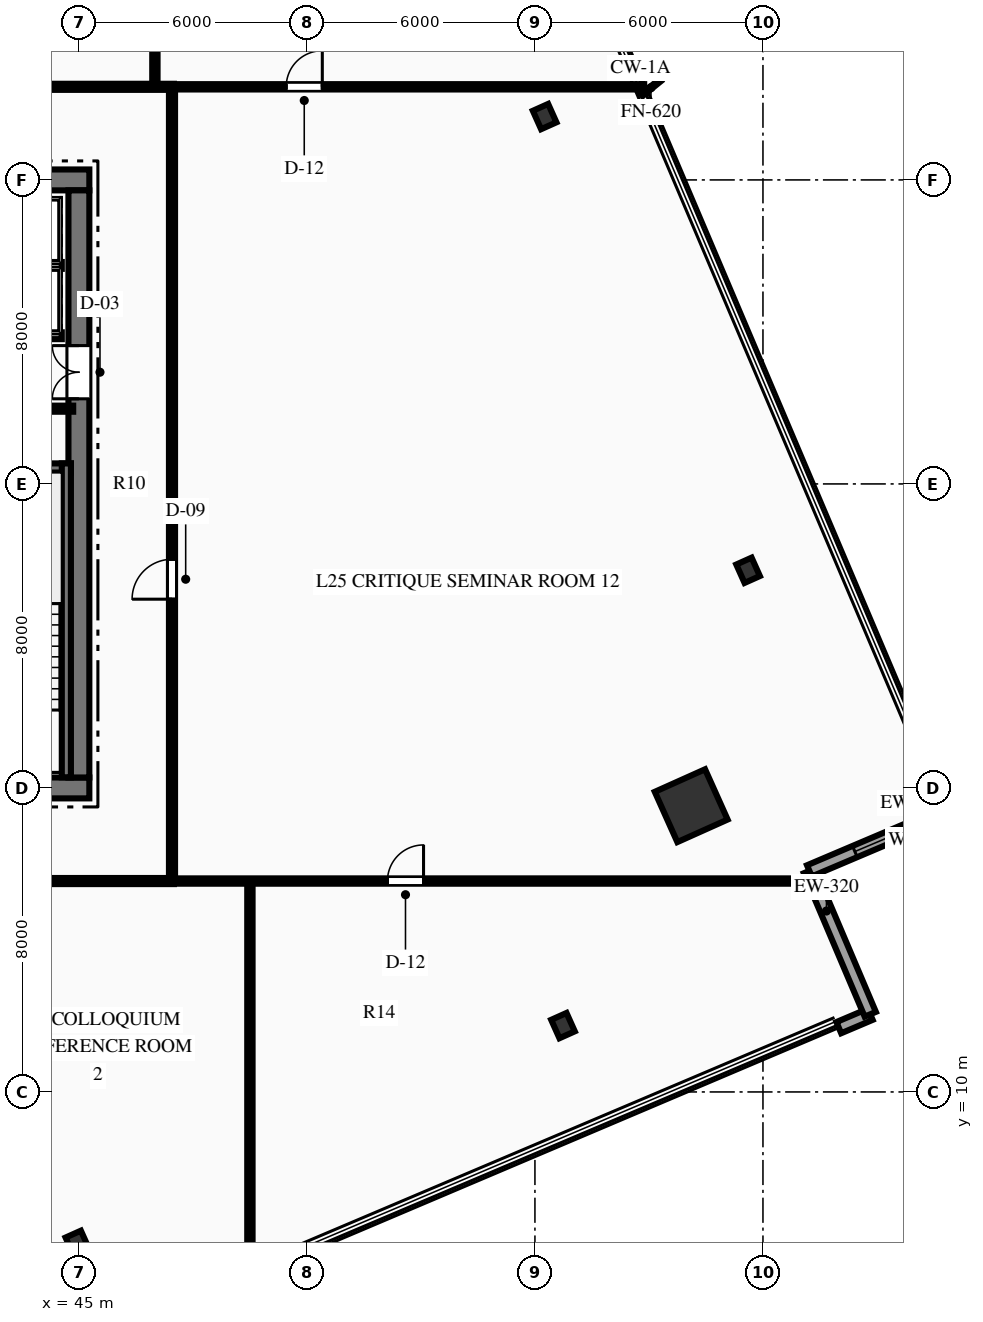
"""IFC4 building model, lengths in metres.
Left out: names, types, materials, properties, quantities, classifications, styles, units other than length and angle.
Written with IfcOpenShell. Run it as: python <this file> out.ifc"""

import sys

from ifc_helpers import new_model, si_unit, direction, frame, frame_2d, origin, origin_2d, place, context, subcontext, project, spatial, rectangle, hollow_rectangle, i_section, extrude, element, fill, save


model = new_model("IFC4")
c1 = context("Model", 3, precision=1e-05, world=origin(), true_north=direction((0.0, 1.0)))
c2 = subcontext(c1, "Body", "Model", "MODEL_VIEW")
j1 = project(units=[si_unit("LENGTHUNIT", "METRE"), si_unit("PLANEANGLEUNIT", "RADIAN")], contexts=[c1])
p1 = place(None, origin())
s1 = spatial("IfcSite", under=j1, at=p1, CompositionType="ELEMENT")
p2 = place(p1, origin())
s2 = spatial("IfcBuilding", under=s1, at=p2, CompositionType="ELEMENT")
p3 = place(p2, frame((0.0, 0.0, 105.45)))
s3 = spatial("IfcBuildingStorey", under=s2, at=p3, CompositionType="ELEMENT", Elevation=105.45)
p4 = place(p3, frame((26.725, 18.0, 0.0), z_axis=(0.0, 0.0, 1.0), x_axis=(1.0, 0.0, 0.0)))
e1 = element("IfcWall", 1, at=p4, inside=s3, PredefinedType="SHEAR", context=c2, shape_type="SweptSolid", body=[
    extrude(rectangle(XDim=18.55, YDim=0.55, at=frame_2d((9.275, 0.0))), origin(), (0.0, 0.0, 1.0), 3.75),
])
p5 = place(p4, frame((7.375, 0.0, 0.0)))
e2 = element("IfcOpeningElement", 2, at=p5, cuts=e1, PredefinedType="OPENING", context=c2, shape_type="SweptSolid", body=[
    extrude(rectangle(XDim=1.1, YDim=2.15, at=frame_2d((0.55, 1.075))), frame((0.0, 0.285, 0.0), z_axis=(0.0, -1.0, 0.0), x_axis=(1.0, 0.0, 0.0)), (0.0, 0.0, 1.0), 0.57),
])
p6 = place(p4, frame((10.075, 0.0, 0.0)))
e3 = element("IfcOpeningElement", 3, at=p6, cuts=e1, PredefinedType="OPENING", context=c2, shape_type="SweptSolid", body=[
    extrude(rectangle(XDim=1.1, YDim=2.15, at=frame_2d((0.55, 1.075))), frame((0.0, 0.285, 0.0), z_axis=(0.0, -1.0, 0.0), x_axis=(1.0, 0.0, 0.0)), (0.0, 0.0, 1.0), 0.57),
])
p7 = place(p3, frame((26.725, 34.0, 0.0), z_axis=(0.0, 0.0, 1.0), x_axis=(1.0, 0.0, 0.0)))
e4 = element("IfcWall", 4, at=p7, inside=s3, PredefinedType="SHEAR", context=c2, shape_type="SweptSolid", body=[
    extrude(rectangle(XDim=18.55, YDim=0.55, at=frame_2d((9.275, 0.0))), origin(), (0.0, 0.0, 1.0), 3.75),
])
p8 = place(p7, frame((1.24, 0.0, 0.0)))
e5 = element("IfcOpeningElement", 5, at=p8, cuts=e4, PredefinedType="OPENING", context=c2, shape_type="SweptSolid", body=[
    extrude(rectangle(XDim=1.1, YDim=2.15, at=frame_2d((0.55, 1.075))), frame((0.0, 0.285, 0.0), z_axis=(0.0, -1.0, 0.0), x_axis=(1.0, 0.0, 0.0)), (0.0, 0.0, 1.0), 0.57),
])
p9 = place(p7, frame((3.49, 0.0, 0.0)))
e6 = element("IfcOpeningElement", 6, at=p9, cuts=e4, PredefinedType="OPENING", context=c2, shape_type="SweptSolid", body=[
    extrude(rectangle(XDim=1.1, YDim=2.15, at=frame_2d((0.55, 1.075))), frame((0.0, 0.285, 0.0), z_axis=(0.0, -1.0, 0.0), x_axis=(1.0, 0.0, 0.0)), (0.0, 0.0, 1.0), 0.57),
])
p10 = place(p7, frame((13.96, 0.0, 0.0)))
e7 = element("IfcOpeningElement", 7, at=p10, cuts=e4, PredefinedType="OPENING", context=c2, shape_type="SweptSolid", body=[
    extrude(rectangle(XDim=1.1, YDim=2.15, at=frame_2d((0.55, 1.075))), frame((0.0, 0.285, 0.0), z_axis=(0.0, -1.0, 0.0), x_axis=(1.0, 0.0, 0.0)), (0.0, 0.0, 1.0), 0.57),
])
p11 = place(p7, frame((16.21, 0.0, 0.0)))
e8 = element("IfcOpeningElement", 8, at=p11, cuts=e4, PredefinedType="OPENING", context=c2, shape_type="SweptSolid", body=[
    extrude(rectangle(XDim=1.1, YDim=2.15, at=frame_2d((0.55, 1.075))), frame((0.0, 0.285, 0.0), z_axis=(0.0, -1.0, 0.0), x_axis=(1.0, 0.0, 0.0)), (0.0, 0.0, 1.0), 0.57),
])
p12 = place(p3, frame((45.0, 18.275, 0.0), z_axis=(0.0, 0.0, 1.0), x_axis=(0.0, 1.0, 0.0)))
e9 = element("IfcWall", 9, at=p12, inside=s3, PredefinedType="SHEAR", context=c2, shape_type="SweptSolid", body=[
    extrude(rectangle(XDim=15.45, YDim=0.55, at=frame_2d((7.725, 0.0))), origin(), (0.0, 0.0, 1.0), 3.75),
])
p13 = place(p12, frame((9.965, 0.0, 0.0)))
e10 = element("IfcOpeningElement", 10, at=p13, cuts=e9, PredefinedType="OPENING", context=c2, shape_type="SweptSolid", body=[
    extrude(rectangle(XDim=1.4, YDim=2.2, at=frame_2d((0.7, 1.1))), frame((0.0, 0.285, 0.0), z_axis=(0.0, -1.0, 0.0), x_axis=(1.0, 0.0, 0.0)), (0.0, 0.0, 1.0), 0.57),
])
p14 = place(p3, frame((40.81, 26.42, 0.0), z_axis=(0.0, 0.0, 1.0), x_axis=(1.0, 0.0, 0.0)))
e11 = element("IfcWall", 11, at=p14, inside=s3, PredefinedType="SHEAR", context=c2, shape_type="SweptSolid", body=[
    extrude(rectangle(XDim=3.98, YDim=0.24, at=frame_2d((1.99, 0.0))), origin(), (0.0, 0.0, 1.0), 3.75),
])
p15 = place(p3, frame((44.67, 18.28, 0.0), z_axis=(0.0, 0.0, 1.0), x_axis=(0.0, 1.0, 0.0)))
e12 = element("IfcWall", 12, at=p15, inside=s3, PredefinedType="SHEAR", context=c2, shape_type="SweptSolid", body=[
    extrude(rectangle(XDim=8.26, YDim=0.24, at=frame_2d((4.13, 0.0))), origin(), (0.0, 0.0, 1.0), 3.75),
])
p16 = place(p3, frame((61.112, 17.533, 0.0), z_axis=(0.0, 0.0, 1.0), x_axis=(0.912477494148, 0.409126902895, 0.0)))
e13 = element("IfcColumn", 13, at=p16, inside=s3, PredefinedType="COLUMN", context=c2, shape_type="SweptSolid", body=[
    extrude(hollow_rectangle(XDim=1.45, YDim=1.45, WallThickness=0.07, at=origin_2d()), origin(), (0.0, 0.0, 1.0), 3.75),
])
for number, where, z_axis, x_axis in (
    (14, (44.96, 6.017, 0.0), (0.0, 0.0, 1.0), (0.912, 0.409, 0.0)),
    (15, (57.738, 11.746, 0.0), (0.0, 0.0, 1.0), (0.912, 0.409, 0.0)),
    (16, (62.609, 23.727, 0.0), (0.0, 0.0, 1.0), (0.912, 0.409, 0.0)),
    (17, (57.255, 35.667, 0.0), (0.0, 0.0, 1.0), (0.912, 0.409, 0.0)),
):
    element("IfcColumn", number, at=place(p3, frame(where, z_axis=z_axis, x_axis=x_axis)), inside=s3, PredefinedType="COLUMN", context=c2, shape_type="SweptSolid", body=[
        extrude(i_section(OverallWidth=0.442, OverallDepth=0.531, WebThickness=0.066, FlangeThickness=0.106, at=origin_2d()), origin(), (0.0, 0.0, 1.0), 3.75),
    ])
p17 = place(p3, frame((65.824, 12.044, 0.0), z_axis=(0.0, 0.0, 1.0), x_axis=(-0.920430982357, -0.390905112165, 0.0)))
e18 = element("IfcWall", 18, at=p17, inside=s3, PredefinedType="STANDARD", context=c2, shape_type="SweptSolid", body=[
    extrude(rectangle(XDim=0.9, YDim=0.32, at=frame_2d((0.45, 0.0))), origin(), (0.0, 0.0, 1.0), 3.45),
])
p18 = place(p3, frame((64.222, 15.818, 0.0), z_axis=(0.0, 0.0, 1.0), x_axis=(0.390733339196, -0.92050391506, 0.0)))
e19 = element("IfcWall", 19, at=p18, inside=s3, PredefinedType="STANDARD", context=c2, shape_type="SweptSolid", body=[
    extrude(rectangle(XDim=4.1, YDim=0.32, at=frame_2d((2.05, 0.0))), origin(), (0.0, 0.0, 1.0), 3.45),
])
p19 = place(p3, frame((67.996, 17.42, 0.0), z_axis=(0.0, 0.0, 1.0), x_axis=(-0.92050391506, -0.390733339196, 0.0)))
e20 = element("IfcWall", 20, at=p19, inside=s3, PredefinedType="STANDARD", context=c2, shape_type="SweptSolid", body=[
    extrude(rectangle(XDim=4.1, YDim=0.32, at=frame_2d((2.05, 0.0))), origin(), (0.0, 0.0, 1.0), 3.45),
])
p20 = place(p19, frame((1.3, 0.0, 0.85)))
e21 = element("IfcOpeningElement", 21, at=p20, cuts=e20, PredefinedType="OPENING", context=c2, shape_type="SweptSolid", body=[
    extrude(rectangle(XDim=1.5, YDim=2.1, at=frame_2d((0.75, 1.05))), frame((0.0, 0.17, 0.0), z_axis=(0.0, -1.0, 0.0), x_axis=(1.0, 0.0, 0.0)), (0.0, 0.0, 1.0), 0.34),
])
p21 = place(p3, frame((40.8, 27.98, 0.0), z_axis=(0.0, 0.0, 1.0), x_axis=(1.0, 0.0, 0.0)))
e22 = element("IfcWall", 22, at=p21, inside=s3, PredefinedType="PARTITIONING", context=c2, shape_type="SweptSolid", body=[
    extrude(rectangle(XDim=4.05, YDim=0.16, at=frame_2d((2.025, 0.0))), origin(), (0.0, 0.0, 1.0), 3.45),
])
p22 = place(p21, frame((0.407, 0.0, 0.0)))
e23 = element("IfcOpeningElement", 23, at=p22, cuts=e22, PredefinedType="OPENING", context=c2, shape_type="SweptSolid", body=[
    extrude(rectangle(XDim=0.9, YDim=2.15, at=frame_2d((0.45, 1.075))), frame((0.0, 0.09, 0.0), z_axis=(0.0, -1.0, 0.0), x_axis=(1.0, 0.0, 0.0)), (0.0, 0.0, 1.0), 0.18),
])
p23 = place(p21, frame((2.2, 0.0, 0.0)))
e24 = element("IfcOpeningElement", 24, at=p23, cuts=e22, PredefinedType="OPENING", context=c2, shape_type="SweptSolid", body=[
    extrude(rectangle(XDim=0.9, YDim=2.15, at=frame_2d((0.45, 1.075))), frame((0.0, 0.09, 0.0), z_axis=(0.0, -1.0, 0.0), x_axis=(1.0, 0.0, 0.0)), (0.0, 0.0, 1.0), 0.18),
])
p24 = place(p3, frame((40.12, 29.9, 0.0), z_axis=(0.0, 0.0, 1.0), x_axis=(1.0, 0.0, 0.0)))
e25 = element("IfcWall", 25, at=p24, inside=s3, PredefinedType="PARTITIONING", context=c2, shape_type="SweptSolid", body=[
    extrude(rectangle(XDim=4.43, YDim=0.18, at=frame_2d((2.215, 0.0))), origin(), (0.0, 0.0, 1.0), 3.45),
])
p25 = place(p24, frame((0.565, 0.0, 0.0)))
e26 = element("IfcOpeningElement", 26, at=p25, cuts=e25, PredefinedType="OPENING", context=c2, shape_type="SweptSolid", body=[
    extrude(rectangle(XDim=1.1, YDim=2.15, at=frame_2d((0.55, 1.075))), frame((0.0, 0.1, 0.0), z_axis=(0.0, -1.0, 0.0), x_axis=(1.0, 0.0, 0.0)), (0.0, 0.0, 1.0), 0.2),
])
p26 = place(p24, frame((2.815, 0.0, 0.0)))
e27 = element("IfcOpeningElement", 27, at=p26, cuts=e25, PredefinedType="OPENING", context=c2, shape_type="SweptSolid", body=[
    extrude(rectangle(XDim=1.1, YDim=2.15, at=frame_2d((0.55, 1.075))), frame((0.0, 0.1, 0.0), z_axis=(0.0, -1.0, 0.0), x_axis=(1.0, 0.0, 0.0)), (0.0, 0.0, 1.0), 0.2),
])
p27 = place(p3, frame((40.12, 31.75, 0.0), z_axis=(0.0, 0.0, 1.0), x_axis=(1.0, 0.0, 0.0)))
e28 = element("IfcWall", 28, at=p27, inside=s3, PredefinedType="PARTITIONING", context=c2, shape_type="SweptSolid", body=[
    extrude(rectangle(XDim=4.43, YDim=0.18, at=frame_2d((2.215, 0.0))), origin(), (0.0, 0.0, 1.0), 3.45),
])
p28 = place(p3, frame((24.5, 15.55, 0.0), z_axis=(0.0, 0.0, 1.0), x_axis=(1.0, 0.0, 0.0)))
e29 = element("IfcWall", 29, at=p28, inside=s3, PredefinedType="PARTITIONING", context=c2, shape_type="SweptSolid", body=[
    extrude(rectangle(XDim=23.0, YDim=0.16, at=frame_2d((11.5, 0.0))), origin(), (0.0, 0.0, 1.0), 3.45),
])
p29 = place(p28, frame((1.25, 0.0, 0.0)))
e30 = element("IfcOpeningElement", 30, at=p29, cuts=e29, PredefinedType="OPENING", context=c2, shape_type="SweptSolid", body=[
    extrude(rectangle(XDim=0.9, YDim=2.15, at=frame_2d((0.45, 1.075))), frame((0.0, 0.09, 0.0), z_axis=(0.0, -1.0, 0.0), x_axis=(1.0, 0.0, 0.0)), (0.0, 0.0, 1.0), 0.18),
])
p30 = place(p28, frame((3.55, 0.0, 0.0)))
e31 = element("IfcOpeningElement", 31, at=p30, cuts=e29, PredefinedType="OPENING", context=c2, shape_type="SweptSolid", body=[
    extrude(rectangle(XDim=0.9, YDim=2.15, at=frame_2d((0.45, 1.075))), frame((0.0, 0.09, 0.0), z_axis=(0.0, -1.0, 0.0), x_axis=(1.0, 0.0, 0.0)), (0.0, 0.0, 1.0), 0.18),
])
p31 = place(p28, frame((5.8, 0.0, 0.0)))
e32 = element("IfcOpeningElement", 32, at=p31, cuts=e29, PredefinedType="OPENING", context=c2, shape_type="SweptSolid", body=[
    extrude(rectangle(XDim=1.0, YDim=2.15, at=frame_2d((0.5, 1.075))), frame((0.0, 0.09, 0.0), z_axis=(0.0, -1.0, 0.0), x_axis=(1.0, 0.0, 0.0)), (0.0, 0.0, 1.0), 0.18),
])
p32 = place(p28, frame((9.875, 0.0, 0.0)))
e33 = element("IfcOpeningElement", 33, at=p32, cuts=e29, PredefinedType="OPENING", context=c2, shape_type="SweptSolid", body=[
    extrude(rectangle(XDim=1.05, YDim=2.15, at=frame_2d((0.525, 1.075))), frame((0.0, 0.09, 0.0), z_axis=(0.0, -1.0, 0.0), x_axis=(1.0, 0.0, 0.0)), (0.0, 0.0, 1.0), 0.18),
])
p33 = place(p28, frame((18.169, 0.0, 0.0)))
e34 = element("IfcOpeningElement", 34, at=p33, cuts=e29, PredefinedType="OPENING", context=c2, shape_type="SweptSolid", body=[
    extrude(rectangle(XDim=1.05, YDim=2.15, at=frame_2d((0.525, 1.075))), frame((0.0, 0.09, 0.0), z_axis=(0.0, -1.0, 0.0), x_axis=(1.0, 0.0, 0.0)), (0.0, 0.0, 1.0), 0.18),
])
p34 = place(p3, frame((24.5, 36.45, 0.0), z_axis=(0.0, 0.0, 1.0), x_axis=(1.0, 0.0, 0.0)))
e35 = element("IfcWall", 35, at=p34, inside=s3, PredefinedType="PARTITIONING", context=c2, shape_type="SweptSolid", body=[
    extrude(rectangle(XDim=23.0, YDim=0.16, at=frame_2d((11.5, 0.0))), origin(), (0.0, 0.0, 1.0), 3.45),
])
p35 = place(p34, frame((7.521, 0.0, 0.0)))
e36 = element("IfcOpeningElement", 36, at=p35, cuts=e35, PredefinedType="OPENING", context=c2, shape_type="SweptSolid", body=[
    extrude(rectangle(XDim=1.05, YDim=2.15, at=frame_2d((0.525, 1.075))), frame((0.0, 0.09, 0.0), z_axis=(0.0, -1.0, 0.0), x_axis=(1.0, 0.0, 0.0)), (0.0, 0.0, 1.0), 0.18),
])
p36 = place(p34, frame((14.375, 0.0, 0.0)))
e37 = element("IfcOpeningElement", 37, at=p36, cuts=e35, PredefinedType="OPENING", context=c2, shape_type="SweptSolid", body=[
    extrude(rectangle(XDim=1.05, YDim=2.15, at=frame_2d((0.525, 1.075))), frame((0.0, 0.09, 0.0), z_axis=(0.0, -1.0, 0.0), x_axis=(1.0, 0.0, 0.0)), (0.0, 0.0, 1.0), 0.18),
])
p37 = place(p3, frame((47.45, 15.55, 0.0), z_axis=(0.0, 0.0, 1.0), x_axis=(0.0, 1.0, 0.0)))
e38 = element("IfcWall", 38, at=p37, inside=s3, PredefinedType="PARTITIONING", context=c2, shape_type="SweptSolid", body=[
    extrude(rectangle(XDim=20.9, YDim=0.16, at=frame_2d((10.45, 0.0))), origin(), (0.0, 0.0, 1.0), 3.45),
])
p38 = place(p37, frame((7.417, 0.0, 0.0)))
e39 = element("IfcOpeningElement", 39, at=p38, cuts=e38, PredefinedType="OPENING", context=c2, shape_type="SweptSolid", body=[
    extrude(rectangle(XDim=1.05, YDim=2.15, at=frame_2d((0.525, 1.075))), frame((0.0, 0.09, 0.0), z_axis=(0.0, -1.0, 0.0), x_axis=(1.0, 0.0, 0.0)), (0.0, 0.0, 1.0), 0.18),
])
p39 = place(p3, frame((47.45, 15.55, 0.0), z_axis=(0.0, 0.0, 1.0), x_axis=(1.0, 0.0, 0.0)))
e40 = element("IfcWall", 40, at=p39, inside=s3, PredefinedType="PARTITIONING", context=c2, shape_type="SweptSolid", body=[
    extrude(rectangle(XDim=16.842, YDim=0.14, at=frame_2d((8.421, 0.0))), origin(), (0.0, 0.0, 1.0), 3.45),
])
p40 = place(p39, frame((5.669, 0.0, 0.0)))
e41 = element("IfcOpeningElement", 41, at=p40, cuts=e40, PredefinedType="OPENING", context=c2, shape_type="SweptSolid", body=[
    extrude(rectangle(XDim=0.95, YDim=2.15, at=frame_2d((0.475, 1.075))), frame((0.0, 0.08, 0.0), z_axis=(0.0, -1.0, 0.0), x_axis=(1.0, 0.0, 0.0)), (0.0, 0.0, 1.0), 0.16),
])
p41 = place(p3, frame((47.45, 36.45, 0.0), z_axis=(0.0, 0.0, 1.0), x_axis=(1.0, 0.0, 0.0)))
e42 = element("IfcWall", 42, at=p41, inside=s3, PredefinedType="PARTITIONING", context=c2, shape_type="SweptSolid", body=[
    extrude(rectangle(XDim=12.425, YDim=0.14, at=frame_2d((6.212, 0.0))), origin(), (0.0, 0.0, 1.0), 3.45),
])
p42 = place(p41, frame((3.005, 0.0, 0.0)))
e43 = element("IfcOpeningElement", 43, at=p42, cuts=e42, PredefinedType="OPENING", context=c2, shape_type="SweptSolid", body=[
    extrude(rectangle(XDim=0.95, YDim=2.15, at=frame_2d((0.475, 1.075))), frame((0.0, 0.08, 0.0), z_axis=(0.0, -1.0, 0.0), x_axis=(1.0, 0.0, 0.0)), (0.0, 0.0, 1.0), 0.16),
])
p43 = place(p3, frame((49.5, 5.158, 0.0), z_axis=(0.0, 0.0, 1.0), x_axis=(0.0, 1.0, 0.0)))
e44 = element("IfcWall", 44, at=p43, inside=s3, PredefinedType="PARTITIONING", context=c2, shape_type="SweptSolid", body=[
    extrude(rectangle(XDim=10.392, YDim=0.14, at=frame_2d((5.196, 0.0))), origin(), (0.0, 0.0, 1.0), 3.45),
])
p44 = place(p3, frame((47.0, 36.45, 0.0), z_axis=(0.0, 0.0, 1.0), x_axis=(0.0, 1.0, 0.0)))
e45 = element("IfcWall", 45, at=p44, inside=s3, PredefinedType="PARTITIONING", context=c2, shape_type="SweptSolid", body=[
    extrude(rectangle(XDim=19.838, YDim=0.14, at=frame_2d((9.919, 0.0))), origin(), (0.0, 0.0, 1.0), 3.45),
])
p45 = place(p20, origin())
e46 = element("IfcWindow", 46, at=p45, inside=s3, PartitioningType="SINGLE_PANEL", PredefinedType="WINDOW", context=c2, shape_type="SweptSolid", body=[
    extrude(rectangle(XDim=1.5, YDim=2.1, at=frame_2d((0.75, 1.05))), frame((0.0, 0.03, 0.0), z_axis=(0.0, -1.0, 0.0), x_axis=(1.0, 0.0, 0.0)), (0.0, 0.0, 1.0), 0.06),
])
fill(e21, e46)
p46 = place(p13, origin())
e47 = element("IfcDoor", 47, at=p46, inside=s3, OperationType="DOUBLE_DOOR_SINGLE_SWING", PredefinedType="DOOR", context=c2, shape_type="SweptSolid", body=[
    extrude(rectangle(XDim=1.4, YDim=2.2, at=frame_2d((0.7, 1.1))), frame((0.0, 0.025, 0.0), z_axis=(0.0, -1.0, 0.0), x_axis=(1.0, 0.0, 0.0)), (0.0, 0.0, 1.0), 0.05),
])
fill(e10, e47)
p47 = place(p40, origin())
e48 = element("IfcDoor", 48, at=p47, inside=s3, OperationType="SINGLE_SWING_RIGHT", PredefinedType="DOOR", context=c2, shape_type="SweptSolid", body=[
    extrude(rectangle(XDim=0.95, YDim=2.15, at=frame_2d((0.475, 1.075))), frame((0.0, 0.025, 0.0), z_axis=(0.0, -1.0, 0.0), x_axis=(1.0, 0.0, 0.0)), (0.0, 0.0, 1.0), 0.05),
])
fill(e41, e48)
p48 = place(p42, origin())
e49 = element("IfcDoor", 49, at=p48, inside=s3, OperationType="SINGLE_SWING_RIGHT", PredefinedType="DOOR", context=c2, shape_type="SweptSolid", body=[
    extrude(rectangle(XDim=0.95, YDim=2.15, at=frame_2d((0.475, 1.075))), frame((0.0, 0.025, 0.0), z_axis=(0.0, -1.0, 0.0), x_axis=(1.0, 0.0, 0.0)), (0.0, 0.0, 1.0), 0.05),
])
fill(e43, e49)
p49 = place(p38, origin())
e50 = element("IfcDoor", 50, at=p49, inside=s3, OperationType="SINGLE_SWING_LEFT", PredefinedType="DOOR", context=c2, shape_type="SweptSolid", body=[
    extrude(rectangle(XDim=1.05, YDim=2.15, at=frame_2d((0.525, 1.075))), frame((0.0, 0.025, 0.0), z_axis=(0.0, -1.0, 0.0), x_axis=(1.0, 0.0, 0.0)), (0.0, 0.0, 1.0), 0.05),
])
fill(e39, e50)
save(model, sys.argv[1])
